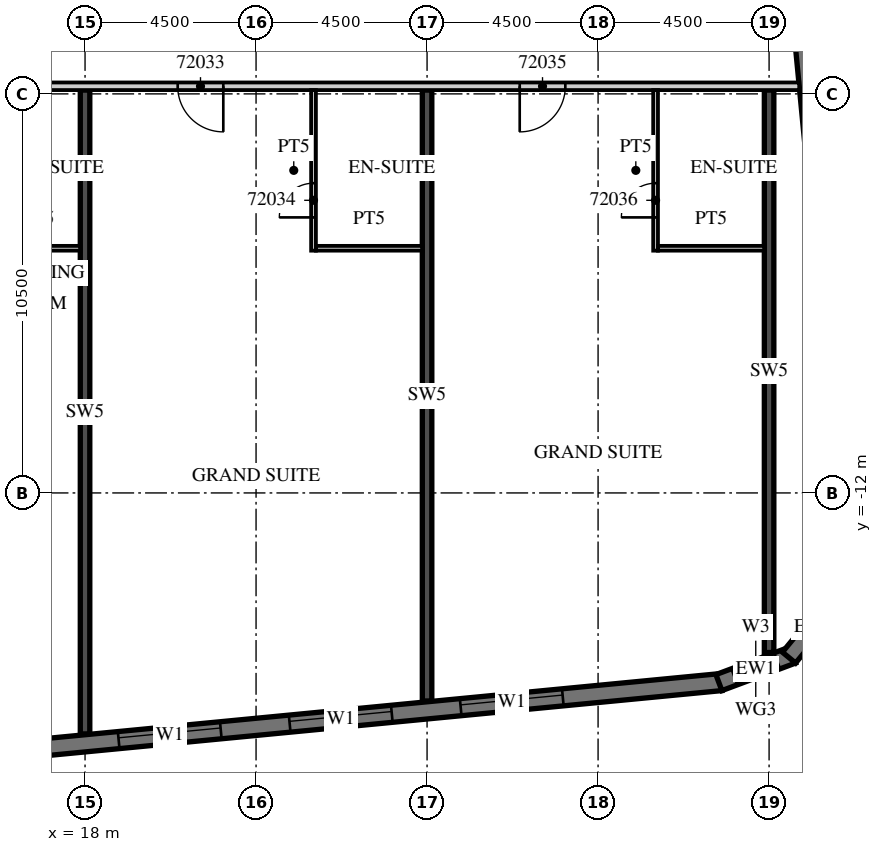
"""IFC4 building model, lengths in metres.
Left out: names, types, materials, properties, quantities, classifications, styles, units other than length and angle.
Written with IfcOpenShell. Run it as: python <this file> out.ifc"""

import sys

from ifc_helpers import new_model, si_unit, direction, frame, frame_2d, origin, place, context, subcontext, project, spatial, polyline, rectangle, outline, extrude, element, fill, save


model = new_model("IFC4")
c1 = context("Model", 3, precision=1e-05, world=origin(), true_north=direction((0.0, 1.0)))
c2 = subcontext(c1, "Body", "Model", "MODEL_VIEW")
j1 = project(units=[si_unit("LENGTHUNIT", "METRE"), si_unit("PLANEANGLEUNIT", "RADIAN")], contexts=[c1])
p1 = place(None, origin())
s1 = spatial("IfcSite", under=j1, at=p1, CompositionType="ELEMENT")
p2 = place(p1, origin())
s2 = spatial("IfcBuilding", under=s1, at=p2, CompositionType="ELEMENT")
p3 = place(p2, frame((0.0, 0.0, 288.3)))
s3 = spatial("IfcBuildingStorey", under=s2, at=p3, CompositionType="ELEMENT", Elevation=288.3)
p4 = place(p3, frame((18.0, -18.341, 0.0), z_axis=(0.0, 0.0, 1.0), x_axis=(0.0, 1.0, 0.0)))
e1 = element("IfcWall", 1, at=p4, inside=s3, PredefinedType="SHEAR", context=c2, shape_type="SweptSolid", body=[
    extrude(rectangle(XDim=16.941, YDim=0.25, at=frame_2d((8.47, 0.0))), origin(), (0.0, 0.0, 1.0), 3.3),
])
p5 = place(p3, frame((27.0, -17.474, 0.0), z_axis=(0.0, 0.0, 1.0), x_axis=(0.0, 1.0, 0.0)))
e2 = element("IfcWall", 2, at=p5, inside=s3, PredefinedType="SHEAR", context=c2, shape_type="SweptSolid", body=[
    extrude(rectangle(XDim=16.074, YDim=0.25, at=frame_2d((8.037, 0.0))), origin(), (0.0, 0.0, 1.0), 3.3),
])
p6 = place(p3, frame((36.0, -16.199, 0.0), z_axis=(0.0, 0.0, 1.0), x_axis=(0.0, 1.0, 0.0)))
e3 = element("IfcWall", 3, at=p6, inside=s3, PredefinedType="SHEAR", context=c2, shape_type="SweptSolid", body=[
    extrude(rectangle(XDim=14.799, YDim=0.25, at=frame_2d((7.399, 0.0))), origin(), (0.0, 0.0, 1.0), 3.3),
])
p7 = place(p3, frame((-13.521, -21.624, 0.0), z_axis=(0.0, 0.0, 1.0), x_axis=(0.995396186218, 0.095845878695, 0.0)))
e4 = element("IfcWall", 4, at=p7, inside=s3, PredefinedType="SOLIDWALL", context=c2, shape_type="SweptSolid", body=[
    extrude(rectangle(XDim=48.481, YDim=0.45, at=frame_2d((24.241, 0.0))), origin(), (0.0, 0.0, 1.0), 3.02),
])
p8 = place(p7, frame((0.91, 0.0, 0.45)))
e5 = element("IfcOpeningElement", 5, at=p8, cuts=e4, PredefinedType="OPENING", context=c2, shape_type="SweptSolid", body=[
    extrude(rectangle(XDim=2.7, YDim=2.25, at=frame_2d((1.35, 1.125))), frame((0.0, 0.235, 0.0), z_axis=(0.0, -1.0, 0.0), x_axis=(1.0, 0.0, 0.0)), (0.0, 0.0, 1.0), 0.47),
])
p9 = place(p7, frame((5.431, 0.0, 0.45)))
e6 = element("IfcOpeningElement", 6, at=p9, cuts=e4, PredefinedType="OPENING", context=c2, shape_type="SweptSolid", body=[
    extrude(rectangle(XDim=2.7, YDim=2.25, at=frame_2d((1.35, 1.125))), frame((0.0, 0.235, 0.0), z_axis=(0.0, -1.0, 0.0), x_axis=(1.0, 0.0, 0.0)), (0.0, 0.0, 1.0), 0.47),
])
p10 = place(p7, frame((9.952, 0.0, 0.45)))
e7 = element("IfcOpeningElement", 7, at=p10, cuts=e4, PredefinedType="OPENING", context=c2, shape_type="SweptSolid", body=[
    extrude(rectangle(XDim=2.7, YDim=2.25, at=frame_2d((1.35, 1.125))), frame((0.0, 0.235, 0.0), z_axis=(0.0, -1.0, 0.0), x_axis=(1.0, 0.0, 0.0)), (0.0, 0.0, 1.0), 0.47),
])
p11 = place(p7, frame((14.473, 0.0, 0.45)))
e8 = element("IfcOpeningElement", 8, at=p11, cuts=e4, PredefinedType="OPENING", context=c2, shape_type="SweptSolid", body=[
    extrude(rectangle(XDim=2.7, YDim=2.25, at=frame_2d((1.35, 1.125))), frame((0.0, 0.235, 0.0), z_axis=(0.0, -1.0, 0.0), x_axis=(1.0, 0.0, 0.0)), (0.0, 0.0, 1.0), 0.47),
])
p12 = place(p7, frame((18.994, 0.0, 0.45)))
e9 = element("IfcOpeningElement", 9, at=p12, cuts=e4, PredefinedType="OPENING", context=c2, shape_type="SweptSolid", body=[
    extrude(rectangle(XDim=2.7, YDim=2.25, at=frame_2d((1.35, 1.125))), frame((0.0, 0.235, 0.0), z_axis=(0.0, -1.0, 0.0), x_axis=(1.0, 0.0, 0.0)), (0.0, 0.0, 1.0), 0.47),
])
p13 = place(p7, frame((23.514, 0.0, 0.45)))
e10 = element("IfcOpeningElement", 10, at=p13, cuts=e4, PredefinedType="OPENING", context=c2, shape_type="SweptSolid", body=[
    extrude(rectangle(XDim=2.7, YDim=2.25, at=frame_2d((1.35, 1.125))), frame((0.0, 0.235, 0.0), z_axis=(0.0, -1.0, 0.0), x_axis=(1.0, 0.0, 0.0)), (0.0, 0.0, 1.0), 0.47),
])
p14 = place(p7, frame((28.035, 0.0, 0.45)))
e11 = element("IfcOpeningElement", 11, at=p14, cuts=e4, PredefinedType="OPENING", context=c2, shape_type="SweptSolid", body=[
    extrude(rectangle(XDim=2.7, YDim=2.25, at=frame_2d((1.35, 1.125))), frame((0.0, 0.235, 0.0), z_axis=(0.0, -1.0, 0.0), x_axis=(1.0, 0.0, 0.0)), (0.0, 0.0, 1.0), 0.47),
])
p15 = place(p7, frame((32.556, 0.0, 0.45)))
e12 = element("IfcOpeningElement", 12, at=p15, cuts=e4, PredefinedType="OPENING", context=c2, shape_type="SweptSolid", body=[
    extrude(rectangle(XDim=2.7, YDim=2.25, at=frame_2d((1.35, 1.125))), frame((0.0, 0.235, 0.0), z_axis=(0.0, -1.0, 0.0), x_axis=(1.0, 0.0, 0.0)), (0.0, 0.0, 1.0), 0.47),
])
p16 = place(p7, frame((37.077, 0.0, 0.45)))
e13 = element("IfcOpeningElement", 13, at=p16, cuts=e4, PredefinedType="OPENING", context=c2, shape_type="SweptSolid", body=[
    extrude(rectangle(XDim=2.7, YDim=2.25, at=frame_2d((1.35, 1.125))), frame((0.0, 0.235, 0.0), z_axis=(0.0, -1.0, 0.0), x_axis=(1.0, 0.0, 0.0)), (0.0, 0.0, 1.0), 0.47),
])
p17 = place(p7, frame((41.598, 0.0, 0.45)))
e14 = element("IfcOpeningElement", 14, at=p17, cuts=e4, PredefinedType="OPENING", context=c2, shape_type="SweptSolid", body=[
    extrude(rectangle(XDim=2.7, YDim=2.25, at=frame_2d((1.35, 1.125))), frame((0.0, 0.235, 0.0), z_axis=(0.0, -1.0, 0.0), x_axis=(1.0, 0.0, 0.0)), (0.0, 0.0, 1.0), 0.47),
])
p18 = place(p3, frame((34.679, -16.99, 0.0), z_axis=(0.0, 0.0, 1.0), x_axis=(0.936677599948, 0.350192909346, 0.0)))
e15 = element("IfcWall", 15, at=p18, inside=s3, PredefinedType="SOLIDWALL", context=c2, shape_type="SweptSolid", body=[
    extrude(outline(polyline([(0.0, -0.225), (2.071, -0.225), (1.95, 0.225), (0.121, 0.225), (0.0, -0.225)])), origin(), (0.0, 0.0, 1.0), 3.02),
])
p19 = place(p18, frame((0.435, 0.0, 0.45)))
e16 = element("IfcOpeningElement", 16, at=p19, cuts=e15, PredefinedType="OPENING", context=c2, shape_type="SweptSolid", body=[
    extrude(rectangle(XDim=1.2, YDim=2.25, at=frame_2d((0.6, 1.125))), frame((0.0, 0.235, 0.0), z_axis=(0.0, -1.0, 0.0), x_axis=(1.0, 0.0, 0.0)), (0.0, 0.0, 1.0), 0.47),
])
p20 = place(p3, frame((36.524, -16.333, 0.0), z_axis=(0.0, 0.0, 1.0), x_axis=(0.636046112757, 0.771651049663, 0.0)))
e17 = element("IfcWall", 17, at=p20, inside=s3, PredefinedType="SOLIDWALL", context=c2, shape_type="SweptSolid", body=[
    extrude(outline(polyline([(0.0, -0.225), (2.071, -0.225), (1.95, 0.225), (0.121, 0.225), (0.0, -0.225)])), origin(), (0.0, 0.0, 1.0), 3.02),
])
p21 = place(p3, frame((38.132, -12.858, 0.0), z_axis=(0.0, 0.0, 1.0), x_axis=(-0.095847749461, 0.995396006082, 0.0)))
e18 = element("IfcWall", 18, at=p21, inside=s3, PredefinedType="SOLIDWALL", context=c2, shape_type="SweptSolid", body=[
    extrude(rectangle(XDim=32.0, YDim=0.45, at=frame_2d((16.0, 0.0))), origin(), (0.0, 0.0, 1.0), 3.02),
])
p22 = place(p3, frame((-13.5, -1.3, 0.0), z_axis=(0.0, 0.0, 1.0), x_axis=(1.0, 0.0, 0.0)))
e19 = element("IfcWall", 19, at=p22, inside=s3, PredefinedType="PARTITIONING", context=c2, shape_type="SweptSolid", body=[
    extrude(rectangle(XDim=50.293, YDim=0.2, at=frame_2d((25.146, 0.0))), origin(), (0.0, 0.0, 1.0), 3.02),
])
p23 = place(p22, frame((0.575, 0.0, 0.0)))
e20 = element("IfcOpeningElement", 20, at=p23, cuts=e19, PredefinedType="OPENING", context=c2, shape_type="SweptSolid", body=[
    extrude(rectangle(XDim=1.0, YDim=2.1, at=frame_2d((0.5, 1.05))), frame((0.0, 0.11, 0.0), z_axis=(0.0, -1.0, 0.0), x_axis=(1.0, 0.0, 0.0)), (0.0, 0.0, 1.0), 0.22),
])
p24 = place(p22, frame((9.863, 0.0, 0.0)))
e21 = element("IfcOpeningElement", 21, at=p24, cuts=e19, PredefinedType="OPENING", context=c2, shape_type="SweptSolid", body=[
    extrude(rectangle(XDim=1.2, YDim=2.1, at=frame_2d((0.6, 1.05))), frame((0.0, 0.11, 0.0), z_axis=(0.0, -1.0, 0.0), x_axis=(1.0, 0.0, 0.0)), (0.0, 0.0, 1.0), 0.22),
])
p25 = place(p22, frame((18.862, 0.0, 0.0)))
e22 = element("IfcOpeningElement", 22, at=p25, cuts=e19, PredefinedType="OPENING", context=c2, shape_type="SweptSolid", body=[
    extrude(rectangle(XDim=1.2, YDim=2.1, at=frame_2d((0.6, 1.05))), frame((0.0, 0.11, 0.0), z_axis=(0.0, -1.0, 0.0), x_axis=(1.0, 0.0, 0.0)), (0.0, 0.0, 1.0), 0.22),
])
p26 = place(p22, frame((25.45, 0.0, 0.0)))
e23 = element("IfcOpeningElement", 23, at=p26, cuts=e19, PredefinedType="OPENING", context=c2, shape_type="SweptSolid", body=[
    extrude(rectangle(XDim=1.0, YDim=2.1, at=frame_2d((0.5, 1.05))), frame((0.0, 0.11, 0.0), z_axis=(0.0, -1.0, 0.0), x_axis=(1.0, 0.0, 0.0)), (0.0, 0.0, 1.0), 0.22),
])
p27 = place(p22, frame((27.55, 0.0, 0.0)))
e24 = element("IfcOpeningElement", 24, at=p27, cuts=e19, PredefinedType="OPENING", context=c2, shape_type="SweptSolid", body=[
    extrude(rectangle(XDim=1.0, YDim=2.1, at=frame_2d((0.5, 1.05))), frame((0.0, 0.11, 0.0), z_axis=(0.0, -1.0, 0.0), x_axis=(1.0, 0.0, 0.0)), (0.0, 0.0, 1.0), 0.22),
])
p28 = place(p22, frame((33.938, 0.0, 0.0)))
e25 = element("IfcOpeningElement", 25, at=p28, cuts=e19, PredefinedType="OPENING", context=c2, shape_type="SweptSolid", body=[
    extrude(rectangle(XDim=1.2, YDim=2.1, at=frame_2d((0.6, 1.05))), frame((0.0, 0.11, 0.0), z_axis=(0.0, -1.0, 0.0), x_axis=(1.0, 0.0, 0.0)), (0.0, 0.0, 1.0), 0.22),
])
p29 = place(p22, frame((42.938, 0.0, 0.0)))
e26 = element("IfcOpeningElement", 26, at=p29, cuts=e19, PredefinedType="OPENING", context=c2, shape_type="SweptSolid", body=[
    extrude(rectangle(XDim=1.2, YDim=2.1, at=frame_2d((0.6, 1.05))), frame((0.0, 0.11, 0.0), z_axis=(0.0, -1.0, 0.0), x_axis=(1.0, 0.0, 0.0)), (0.0, 0.0, 1.0), 0.22),
])
p30 = place(p3, frame((15.625, -5.562, 0.0), z_axis=(0.0, 0.0, 1.0), x_axis=(1.0, 0.0, 0.0)))
e27 = element("IfcWall", 27, at=p30, inside=s3, PredefinedType="PARTITIONING", context=c2, shape_type="SweptSolid", body=[
    extrude(rectangle(XDim=2.25, YDim=0.125, at=frame_2d((1.125, 0.0))), origin(), (0.0, 0.0, 1.0), 3.02),
])
p31 = place(p3, frame((24.012, -5.625, 0.0), z_axis=(0.0, 0.0, 1.0), x_axis=(0.0, 1.0, 0.0)))
e28 = element("IfcWall", 28, at=p31, inside=s3, PredefinedType="PARTITIONING", context=c2, shape_type="SweptSolid", body=[
    extrude(rectangle(XDim=4.225, YDim=0.125, at=frame_2d((2.113, 0.0))), origin(), (0.0, 0.0, 1.0), 3.02),
])
p32 = place(p31, frame((0.875, 0.0, 0.0)))
e29 = element("IfcOpeningElement", 29, at=p32, cuts=e28, PredefinedType="OPENING", context=c2, shape_type="SweptSolid", body=[
    extrude(rectangle(XDim=0.9, YDim=2.1, at=frame_2d((0.45, 1.05))), frame((0.0, 0.073, 0.0), z_axis=(0.0, -1.0, 0.0), x_axis=(1.0, 0.0, 0.0)), (0.0, 0.0, 1.0), 0.145),
])
p33 = place(p3, frame((24.075, -5.562, 0.0), z_axis=(0.0, 0.0, 1.0), x_axis=(1.0, 0.0, 0.0)))
e30 = element("IfcWall", 30, at=p33, inside=s3, PredefinedType="PARTITIONING", context=c2, shape_type="SweptSolid", body=[
    extrude(rectangle(XDim=2.8, YDim=0.125, at=frame_2d((1.4, 0.0))), origin(), (0.0, 0.0, 1.0), 3.02),
])
p34 = place(p3, frame((33.013, -5.625, 0.0), z_axis=(0.0, 0.0, 1.0), x_axis=(0.0, 1.0, 0.0)))
e31 = element("IfcWall", 31, at=p34, inside=s3, PredefinedType="PARTITIONING", context=c2, shape_type="SweptSolid", body=[
    extrude(rectangle(XDim=4.225, YDim=0.125, at=frame_2d((2.113, 0.0))), origin(), (0.0, 0.0, 1.0), 3.02),
])
p35 = place(p34, frame((0.875, 0.0, 0.0)))
e32 = element("IfcOpeningElement", 32, at=p35, cuts=e31, PredefinedType="OPENING", context=c2, shape_type="SweptSolid", body=[
    extrude(rectangle(XDim=0.9, YDim=2.1, at=frame_2d((0.45, 1.05))), frame((0.0, 0.073, 0.0), z_axis=(0.0, -1.0, 0.0), x_axis=(1.0, 0.0, 0.0)), (0.0, 0.0, 1.0), 0.145),
])
p36 = place(p3, frame((33.075, -5.562, 0.0), z_axis=(0.0, 0.0, 1.0), x_axis=(1.0, 0.0, 0.0)))
e33 = element("IfcWall", 33, at=p36, inside=s3, PredefinedType="PARTITIONING", context=c2, shape_type="SweptSolid", body=[
    extrude(rectangle(XDim=2.8, YDim=0.125, at=frame_2d((1.4, 0.0))), origin(), (0.0, 0.0, 1.0), 3.02),
])
p37 = place(p15, origin())
e34 = element("IfcWindow", 34, at=p37, inside=s3, PartitioningType="SINGLE_PANEL", PredefinedType="WINDOW", context=c2, shape_type="SweptSolid", body=[
    extrude(rectangle(XDim=2.7, YDim=2.25, at=frame_2d((1.35, 1.125))), frame((0.0, 0.09, 0.0), z_axis=(0.0, -1.0, 0.0), x_axis=(1.0, 0.0, 0.0)), (0.0, 0.0, 1.0), 0.06),
])
fill(e12, e34)
p38 = place(p16, origin())
e35 = element("IfcWindow", 35, at=p38, inside=s3, PartitioningType="SINGLE_PANEL", PredefinedType="WINDOW", context=c2, shape_type="SweptSolid", body=[
    extrude(rectangle(XDim=2.7, YDim=2.25, at=frame_2d((1.35, 1.125))), frame((0.0, 0.09, 0.0), z_axis=(0.0, -1.0, 0.0), x_axis=(1.0, 0.0, 0.0)), (0.0, 0.0, 1.0), 0.06),
])
fill(e13, e35)
p39 = place(p17, origin())
e36 = element("IfcWindow", 36, at=p39, inside=s3, PartitioningType="SINGLE_PANEL", PredefinedType="WINDOW", context=c2, shape_type="SweptSolid", body=[
    extrude(rectangle(XDim=2.7, YDim=2.25, at=frame_2d((1.35, 1.125))), frame((0.0, 0.09, 0.0), z_axis=(0.0, -1.0, 0.0), x_axis=(1.0, 0.0, 0.0)), (0.0, 0.0, 1.0), 0.06),
])
fill(e14, e36)
p40 = place(p19, origin())
e37 = element("IfcWindow", 37, at=p40, inside=s3, PartitioningType="SINGLE_PANEL", PredefinedType="WINDOW", context=c2, shape_type="SweptSolid", body=[
    extrude(rectangle(XDim=1.2, YDim=2.25, at=frame_2d((0.6, 1.125))), frame((0.0, 0.09, 0.0), z_axis=(0.0, -1.0, 0.0), x_axis=(1.0, 0.0, 0.0)), (0.0, 0.0, 1.0), 0.06),
])
fill(e16, e37)
p41 = place(p28, origin())
e38 = element("IfcDoor", 38, at=p41, inside=s3, OperationType="SINGLE_SWING_RIGHT", PredefinedType="DOOR", context=c2, shape_type="SweptSolid", body=[
    extrude(rectangle(XDim=1.2, YDim=2.1, at=frame_2d((0.6, 1.05))), frame((0.0, 0.025, 0.0), z_axis=(0.0, -1.0, 0.0), x_axis=(1.0, 0.0, 0.0)), (0.0, 0.0, 1.0), 0.05),
])
fill(e25, e38)
p42 = place(p32, origin())
e39 = element("IfcDoor", 39, at=p42, inside=s3, OperationType="SINGLE_SWING_LEFT", PredefinedType="DOOR", context=c2, shape_type="SweptSolid", body=[
    extrude(rectangle(XDim=0.9, YDim=2.1, at=frame_2d((0.45, 1.05))), frame((0.0, 0.025, 0.0), z_axis=(0.0, -1.0, 0.0), x_axis=(1.0, 0.0, 0.0)), (0.0, 0.0, 1.0), 0.05),
])
fill(e29, e39)
p43 = place(p29, origin())
e40 = element("IfcDoor", 40, at=p43, inside=s3, OperationType="SINGLE_SWING_LEFT", PredefinedType="DOOR", context=c2, shape_type="SweptSolid", body=[
    extrude(rectangle(XDim=1.2, YDim=2.1, at=frame_2d((0.6, 1.05))), frame((0.0, 0.025, 0.0), z_axis=(0.0, -1.0, 0.0), x_axis=(1.0, 0.0, 0.0)), (0.0, 0.0, 1.0), 0.05),
])
fill(e26, e40)
p44 = place(p35, origin())
e41 = element("IfcDoor", 41, at=p44, inside=s3, OperationType="SINGLE_SWING_LEFT", PredefinedType="DOOR", context=c2, shape_type="SweptSolid", body=[
    extrude(rectangle(XDim=0.9, YDim=2.1, at=frame_2d((0.45, 1.05))), frame((0.0, 0.025, 0.0), z_axis=(0.0, -1.0, 0.0), x_axis=(1.0, 0.0, 0.0)), (0.0, 0.0, 1.0), 0.05),
])
fill(e32, e41)
save(model, sys.argv[1])
